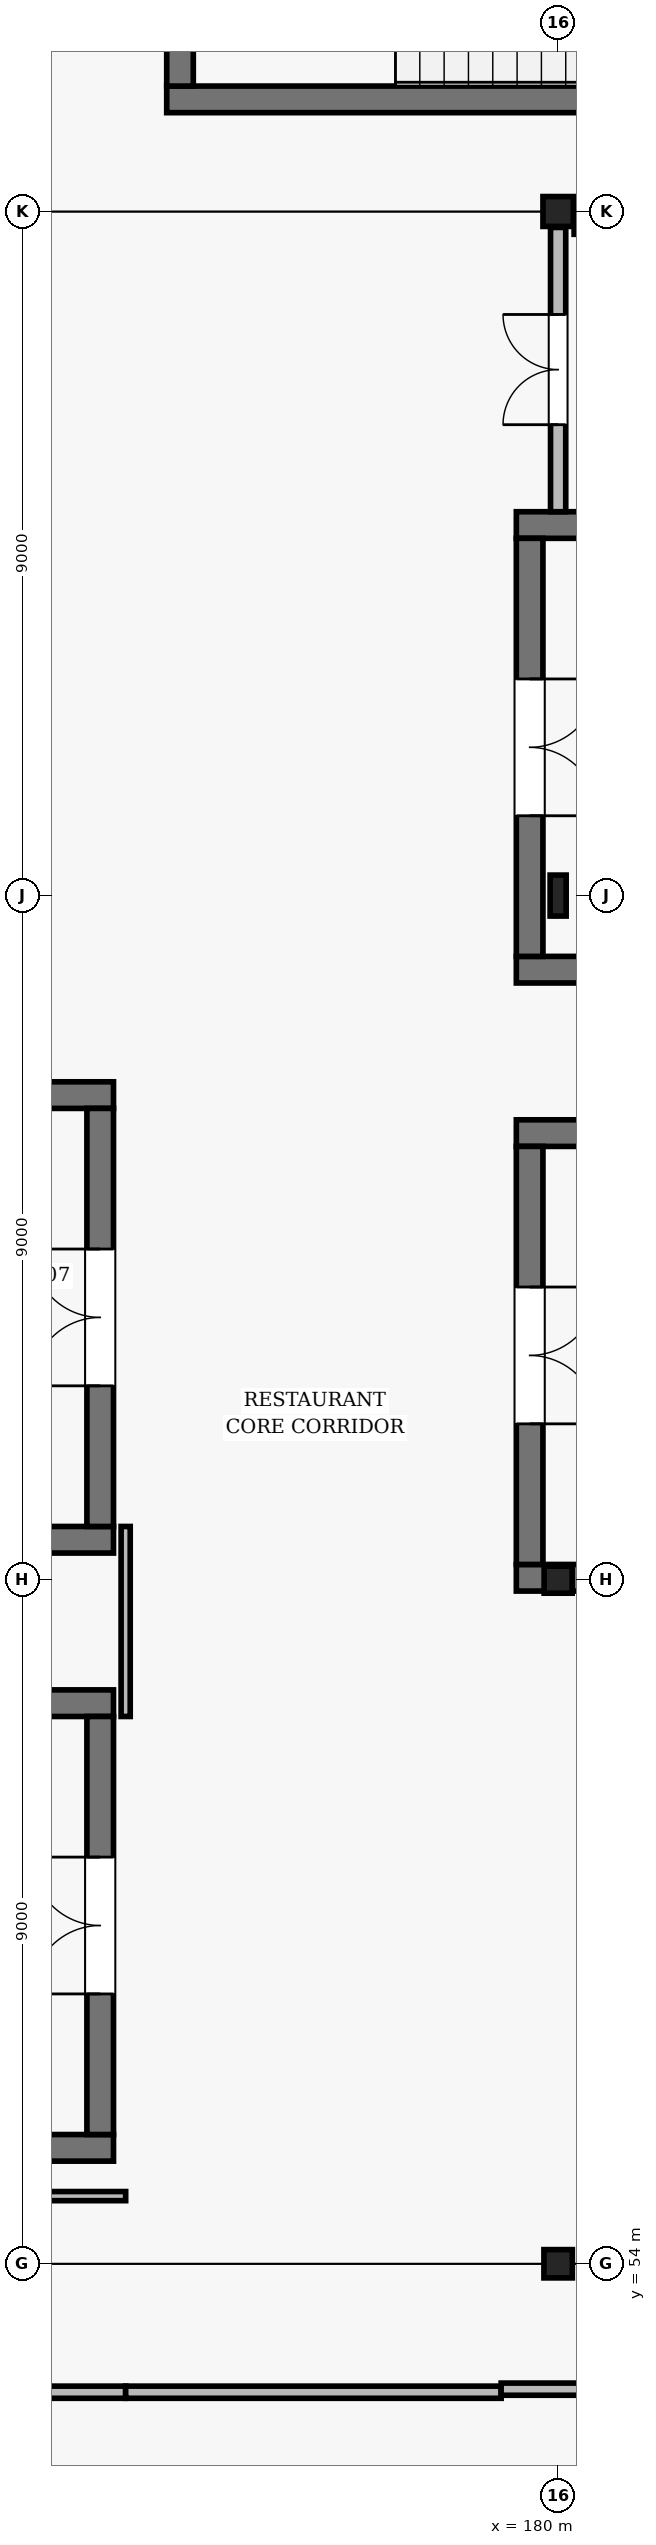
"""IFC4 building model, lengths in metres.
Left out: names, types, materials, properties, quantities, classifications, styles, units other than length and angle.
Written with IfcOpenShell. Run it as: python <this file> out.ifc"""

import sys

from ifc_helpers import new_model, si_unit, direction, frame, frame_2d, origin, origin_2d, place, context, subcontext, project, spatial, rectangle, i_section, extrude, element, fill, save


model = new_model("IFC4")
c1 = context("Model", 3, precision=1e-05, world=origin(), true_north=direction((0.0, 1.0)))
c2 = subcontext(c1, "Body", "Model", "MODEL_VIEW")
j1 = project(units=[si_unit("LENGTHUNIT", "METRE"), si_unit("PLANEANGLEUNIT", "RADIAN")], contexts=[c1])
p1 = place(None, origin())
s1 = spatial("IfcSite", under=j1, at=p1, CompositionType="ELEMENT")
p2 = place(p1, origin())
s2 = spatial("IfcBuilding", under=s1, at=p2, CompositionType="ELEMENT")
p3 = place(p2, frame((0.0, 0.0, 15.6)))
s3 = spatial("IfcBuildingStorey", under=s2, at=p3, CompositionType="ELEMENT", Elevation=15.6)
p4 = place(p3, frame((180.0, 54.0, 0.0), z_axis=(0.0, 0.0, 1.0), x_axis=(1.0, 0.0, 0.0)))
e1 = element("IfcColumn", 1, at=p4, inside=s3, PredefinedType="COLUMN", context=c2, shape_type="SweptSolid", body=[
    extrude(i_section(OverallWidth=0.374, OverallDepth=0.372, WebThickness=0.016, FlangeThickness=0.026, FilletRadius=0.016, at=origin_2d()), origin(), (0.0, 0.0, 1.0), 4.8),
])
p5 = place(p3, frame((180.0, 63.0, 0.0), z_axis=(0.0, 0.0, 1.0), x_axis=(1.0, 0.0, 0.0)))
e2 = element("IfcColumn", 2, at=p5, inside=s3, PredefinedType="COLUMN", context=c2, shape_type="SweptSolid", body=[
    extrude(i_section(OverallWidth=0.369, OverallDepth=0.356, WebThickness=0.011, FlangeThickness=0.018, FilletRadius=0.015, at=origin_2d()), origin(), (0.0, 0.0, 1.0), 4.8),
])
p6 = place(p3, frame((180.0, 72.0, 0.0), z_axis=(0.0, 0.0, 1.0), x_axis=(1.0, 0.0, 0.0)))
e3 = element("IfcColumn", 3, at=p6, inside=s3, PredefinedType="COLUMN", context=c2, shape_type="SweptSolid", body=[
    extrude(i_section(OverallWidth=0.211, OverallDepth=0.539, WebThickness=0.012, FlangeThickness=0.019, FilletRadius=0.014, at=origin_2d()), origin(), (0.0, 0.0, 1.0), 4.8),
])
p7 = place(p3, frame((180.0, 81.0, 0.0), z_axis=(0.0, 0.0, 1.0), x_axis=(1.0, 0.0, 0.0)))
e4 = element("IfcColumn", 4, at=p7, inside=s3, PredefinedType="COLUMN", context=c2, shape_type="SweptSolid", body=[
    extrude(i_section(OverallWidth=0.399, OverallDepth=0.393, WebThickness=0.023, FlangeThickness=0.037, FilletRadius=0.018, at=origin_2d()), origin(), (0.0, 0.0, 1.0), 4.8),
])
for number, where, z_axis, x_axis in (
    (5, (162.05, 55.525, 0.0), (0.0, 0.0, 1.0), (1.0, 0.0, 0.0)),
    (6, (174.15, 61.375, 0.0), (0.0, 0.0, 1.0), (-1.0, 0.0, 0.0)),
):
    element("IfcWall", number, at=place(p3, frame(where, z_axis=z_axis, x_axis=x_axis)), inside=s3, PredefinedType="SHEAR", context=c2, shape_type="SweptSolid", body=[
        extrude(rectangle(XDim=12.1, YDim=0.35, at=frame_2d((6.05, 0.0))), origin(), (0.0, 0.0, 1.0), 4.6),
    ])
p8 = place(p3, frame((173.975, 55.7, 0.0), z_axis=(0.0, 0.0, 1.0), x_axis=(0.0, 1.0, 0.0)))
e7 = element("IfcWall", 7, at=p8, inside=s3, PredefinedType="SHEAR", context=c2, shape_type="SweptSolid", body=[
    extrude(rectangle(XDim=5.5, YDim=0.35, at=frame_2d((2.75, 0.0))), origin(), (0.0, 0.0, 1.0), 4.6),
])
p9 = place(p8, frame((1.85, 0.0, 0.0)))
e8 = element("IfcOpeningElement", 8, at=p9, cuts=e7, PredefinedType="OPENING", context=c2, shape_type="SweptSolid", body=[
    extrude(rectangle(XDim=1.8, YDim=2.2, at=frame_2d((0.9, 1.1))), frame((0.0, 0.185, 0.0), z_axis=(0.0, -1.0, 0.0), x_axis=(1.0, 0.0, 0.0)), (0.0, 0.0, 1.0), 0.37),
])
for number, where, z_axis, x_axis in (
    (9, (162.05, 63.525, 0.0), (0.0, 0.0, 1.0), (1.0, 0.0, 0.0)),
    (10, (174.15, 69.375, 0.0), (0.0, 0.0, 1.0), (-1.0, 0.0, 0.0)),
):
    element("IfcWall", number, at=place(p3, frame(where, z_axis=z_axis, x_axis=x_axis)), inside=s3, PredefinedType="SHEAR", context=c2, shape_type="SweptSolid", body=[
        extrude(rectangle(XDim=12.1, YDim=0.35, at=frame_2d((6.05, 0.0))), origin(), (0.0, 0.0, 1.0), 4.6),
    ])
p10 = place(p3, frame((173.975, 63.7, 0.0), z_axis=(0.0, 0.0, 1.0), x_axis=(0.0, 1.0, 0.0)))
e11 = element("IfcWall", 11, at=p10, inside=s3, PredefinedType="SHEAR", context=c2, shape_type="SweptSolid", body=[
    extrude(rectangle(XDim=5.5, YDim=0.35, at=frame_2d((2.75, 0.0))), origin(), (0.0, 0.0, 1.0), 4.6),
])
p11 = place(p10, frame((1.85, 0.0, 0.0)))
e12 = element("IfcOpeningElement", 12, at=p11, cuts=e11, PredefinedType="OPENING", context=c2, shape_type="SweptSolid", body=[
    extrude(rectangle(XDim=1.8, YDim=2.2, at=frame_2d((0.9, 1.1))), frame((0.0, 0.185, 0.0), z_axis=(0.0, -1.0, 0.0), x_axis=(1.0, 0.0, 0.0)), (0.0, 0.0, 1.0), 0.37),
])
p12 = place(p3, frame((179.45, 63.025, 0.0), z_axis=(0.0, 0.0, 1.0), x_axis=(1.0, 0.0, 0.0)))
e13 = element("IfcWall", 13, at=p12, inside=s3, PredefinedType="SHEAR", context=c2, shape_type="SweptSolid", body=[
    extrude(rectangle(XDim=12.373, YDim=0.35, at=frame_2d((6.186, 0.0))), origin(), (0.0, 0.0, 1.0), 4.6),
])
p13 = place(p3, frame((191.55, 68.875, 0.0), z_axis=(0.0, 0.0, 1.0), x_axis=(-1.0, 0.0, 0.0)))
e14 = element("IfcWall", 14, at=p13, inside=s3, PredefinedType="SHEAR", context=c2, shape_type="SweptSolid", body=[
    extrude(rectangle(XDim=12.1, YDim=0.35, at=frame_2d((6.05, 0.0))), origin(), (0.0, 0.0, 1.0), 4.6),
])
p14 = place(p3, frame((179.625, 68.7, 0.0), z_axis=(0.0, 0.0, 1.0), x_axis=(0.0, -1.0, 0.0)))
e15 = element("IfcWall", 15, at=p14, inside=s3, PredefinedType="SHEAR", context=c2, shape_type="SweptSolid", body=[
    extrude(rectangle(XDim=5.5, YDim=0.35, at=frame_2d((2.75, 0.0))), origin(), (0.0, 0.0, 1.0), 4.6),
])
p15 = place(p14, frame((1.85, 0.0, 0.0)))
e16 = element("IfcOpeningElement", 16, at=p15, cuts=e15, PredefinedType="OPENING", context=c2, shape_type="SweptSolid", body=[
    extrude(rectangle(XDim=1.8, YDim=2.2, at=frame_2d((0.9, 1.1))), frame((0.0, 0.185, 0.0), z_axis=(0.0, -1.0, 0.0), x_axis=(1.0, 0.0, 0.0)), (0.0, 0.0, 1.0), 0.37),
])
for number, where, z_axis, x_axis in (
    (17, (179.45, 71.025, 0.0), (0.0, 0.0, 1.0), (1.0, 0.0, 0.0)),
    (18, (191.55, 76.875, 0.0), (0.0, 0.0, 1.0), (-1.0, 0.0, 0.0)),
):
    element("IfcWall", number, at=place(p3, frame(where, z_axis=z_axis, x_axis=x_axis)), inside=s3, PredefinedType="SHEAR", context=c2, shape_type="SweptSolid", body=[
        extrude(rectangle(XDim=12.1, YDim=0.35, at=frame_2d((6.05, 0.0))), origin(), (0.0, 0.0, 1.0), 4.6),
    ])
p16 = place(p3, frame((179.625, 76.7, 0.0), z_axis=(0.0, 0.0, 1.0), x_axis=(0.0, -1.0, 0.0)))
e19 = element("IfcWall", 19, at=p16, inside=s3, PredefinedType="SHEAR", context=c2, shape_type="SweptSolid", body=[
    extrude(rectangle(XDim=5.5, YDim=0.35, at=frame_2d((2.75, 0.0))), origin(), (0.0, 0.0, 1.0), 4.6),
])
p17 = place(p16, frame((1.85, 0.0, 0.0)))
e20 = element("IfcOpeningElement", 20, at=p17, cuts=e19, PredefinedType="OPENING", context=c2, shape_type="SweptSolid", body=[
    extrude(rectangle(XDim=1.8, YDim=2.2, at=frame_2d((0.9, 1.1))), frame((0.0, 0.185, 0.0), z_axis=(0.0, -1.0, 0.0), x_axis=(1.0, 0.0, 0.0)), (0.0, 0.0, 1.0), 0.37),
])
p18 = place(p3, frame((174.85, 82.475, 0.0), z_axis=(0.0, 0.0, 1.0), x_axis=(1.0, 0.0, 0.0)))
e21 = element("IfcWall", 21, at=p18, inside=s3, PredefinedType="SHEAR", context=c2, shape_type="SweptSolid", body=[
    extrude(rectangle(XDim=12.1, YDim=0.35, at=frame_2d((6.05, 0.0))), origin(), (0.0, 0.0, 1.0), 4.6),
])
p19 = place(p3, frame((175.025, 88.15, 0.0), z_axis=(0.0, 0.0, 1.0), x_axis=(0.0, -1.0, 0.0)))
e22 = element("IfcWall", 22, at=p19, inside=s3, PredefinedType="SHEAR", context=c2, shape_type="SweptSolid", body=[
    extrude(rectangle(XDim=5.5, YDim=0.35, at=frame_2d((2.75, 0.0))), origin(), (0.0, 0.0, 1.0), 4.6),
])
p20 = place(p19, frame((1.85, 0.0, 0.0)))
e23 = element("IfcOpeningElement", 23, at=p20, cuts=e22, PredefinedType="OPENING", context=c2, shape_type="SweptSolid", body=[
    extrude(rectangle(XDim=1.8, YDim=2.2, at=frame_2d((0.9, 1.1))), frame((0.0, 0.185, 0.0), z_axis=(0.0, -1.0, 0.0), x_axis=(1.0, 0.0, 0.0)), (0.0, 0.0, 1.0), 0.37),
])
p21 = place(p3, frame((180.21, 80.8, 0.0), z_axis=(0.0, 0.0, 1.0), x_axis=(1.0, 0.0, 0.0)))
e24 = element("IfcWall", 24, at=p21, inside=s3, PredefinedType="PARTITIONING", context=c2, shape_type="SweptSolid", body=[
    extrude(rectangle(XDim=11.23, YDim=0.2, at=frame_2d((5.615, 0.0))), origin(), (0.0, 0.0, 1.0), 3.812),
])
p22 = place(p3, frame((180.0, 77.05, 0.0), z_axis=(0.0, 0.0, 1.0), x_axis=(0.0, 1.0, 0.0)))
e25 = element("IfcWall", 25, at=p22, inside=s3, PredefinedType="PARTITIONING", context=c2, shape_type="SweptSolid", body=[
    extrude(rectangle(XDim=3.74, YDim=0.2, at=frame_2d((1.87, 0.0))), origin(), (0.0, 0.0, 1.0), 3.901),
])
p23 = place(p22, frame((1.145, 0.0, 0.0)))
e26 = element("IfcOpeningElement", 26, at=p23, cuts=e25, PredefinedType="OPENING", context=c2, shape_type="SweptSolid", body=[
    extrude(rectangle(XDim=1.45, YDim=2.3, at=frame_2d((0.725, 1.15))), frame((0.0, 0.11, 0.0), z_axis=(0.0, -1.0, 0.0), x_axis=(1.0, 0.0, 0.0)), (0.0, 0.0, 1.0), 0.22),
])
p24 = place(p3, frame((174.31, 63.7, 0.0), z_axis=(0.0, 0.0, 1.0), x_axis=(0.0, -1.0, 0.0)))
e27 = element("IfcWall", 27, at=p24, inside=s3, PredefinedType="PARTITIONING", context=c2, shape_type="SweptSolid", body=[
    extrude(rectangle(XDim=2.5, YDim=0.12, at=frame_2d((1.25, 0.0))), origin(), (0.0, 0.0, 1.0), 3.89),
])
p25 = place(p3, frame((174.31, 54.89, 0.0), z_axis=(0.0, 0.0, 1.0), x_axis=(-1.0, 0.0, 0.0)))
e28 = element("IfcWall", 28, at=p25, inside=s3, PredefinedType="PARTITIONING", context=c2, shape_type="SweptSolid", body=[
    extrude(rectangle(XDim=14.96, YDim=0.12, at=frame_2d((7.48, 0.0))), origin(), (0.0, 0.0, 1.0), 3.812),
])
p26 = place(p3, frame((153.14, 52.31, 0.0), z_axis=(0.0, 0.0, 1.0), x_axis=(1.0, 0.0, 0.0)))
e29 = element("IfcWall", 29, at=p26, inside=s3, PredefinedType="PARTITIONING", context=c2, shape_type="SweptSolid", body=[
    extrude(rectangle(XDim=21.17, YDim=0.16, at=frame_2d((10.585, 0.0))), origin(), (0.0, 0.0, 1.0), 3.73),
])
p27 = place(p26, frame((9.46, 0.0, 0.0)))
e30 = element("IfcOpeningElement", 30, at=p27, cuts=e29, PredefinedType="OPENING", context=c2, shape_type="SweptSolid", body=[
    extrude(rectangle(XDim=2.25, YDim=2.4, at=frame_2d((1.125, 1.2))), frame((0.0, 0.09, 0.0), z_axis=(0.0, -1.0, 0.0), x_axis=(1.0, 0.0, 0.0)), (0.0, 0.0, 1.0), 0.18),
])
p28 = place(p3, frame((174.31, 52.31, 0.0), z_axis=(0.0, 0.0, 1.0), x_axis=(1.0, 0.0, 0.0)))
e31 = element("IfcWall", 31, at=p28, inside=s3, PredefinedType="PARTITIONING", context=c2, shape_type="SweptSolid", body=[
    extrude(rectangle(XDim=4.94, YDim=0.16, at=frame_2d((2.47, 0.0))), origin(), (0.0, 0.0, 1.0), 4.128),
])
p29 = place(p3, frame((179.25, 52.35, 0.0), z_axis=(0.0, 0.0, 1.0), x_axis=(1.0, 0.0, 0.0)))
e32 = element("IfcWall", 32, at=p29, inside=s3, PredefinedType="PARTITIONING", context=c2, shape_type="SweptSolid", body=[
    extrude(rectangle(XDim=12.738, YDim=0.16, at=frame_2d((6.369, 0.0))), origin(), (0.0, 0.0, 1.0), 3.73),
])
p30 = place(p9, origin())
e33 = element("IfcDoor", 33, at=p30, inside=s3, OperationType="DOUBLE_DOOR_SINGLE_SWING", PredefinedType="DOOR", context=c2, shape_type="SweptSolid", body=[
    extrude(rectangle(XDim=1.8, YDim=2.2, at=frame_2d((0.9, 1.1))), frame((0.0, 0.025, 0.0), z_axis=(0.0, -1.0, 0.0), x_axis=(1.0, 0.0, 0.0)), (0.0, 0.0, 1.0), 0.05),
])
fill(e8, e33)
p31 = place(p11, origin())
e34 = element("IfcDoor", 34, at=p31, inside=s3, OperationType="DOUBLE_DOOR_SINGLE_SWING", PredefinedType="DOOR", context=c2, shape_type="SweptSolid", body=[
    extrude(rectangle(XDim=1.8, YDim=2.2, at=frame_2d((0.9, 1.1))), frame((0.0, 0.025, 0.0), z_axis=(0.0, -1.0, 0.0), x_axis=(1.0, 0.0, 0.0)), (0.0, 0.0, 1.0), 0.05),
])
fill(e12, e34)
p32 = place(p15, origin())
e35 = element("IfcDoor", 35, at=p32, inside=s3, OperationType="DOUBLE_DOOR_SINGLE_SWING", PredefinedType="DOOR", context=c2, shape_type="SweptSolid", body=[
    extrude(rectangle(XDim=1.8, YDim=2.2, at=frame_2d((0.9, 1.1))), frame((0.0, 0.025, 0.0), z_axis=(0.0, -1.0, 0.0), x_axis=(1.0, 0.0, 0.0)), (0.0, 0.0, 1.0), 0.05),
])
fill(e16, e35)
p33 = place(p17, origin())
e36 = element("IfcDoor", 36, at=p33, inside=s3, OperationType="DOUBLE_DOOR_SINGLE_SWING", PredefinedType="DOOR", context=c2, shape_type="SweptSolid", body=[
    extrude(rectangle(XDim=1.8, YDim=2.2, at=frame_2d((0.9, 1.1))), frame((0.0, 0.025, 0.0), z_axis=(0.0, -1.0, 0.0), x_axis=(1.0, 0.0, 0.0)), (0.0, 0.0, 1.0), 0.05),
])
fill(e20, e36)
p34 = place(p23, origin())
e37 = element("IfcDoor", 37, at=p34, inside=s3, OperationType="DOUBLE_DOOR_SINGLE_SWING", PredefinedType="DOOR", context=c2, shape_type="SweptSolid", body=[
    extrude(rectangle(XDim=1.45, YDim=2.3, at=frame_2d((0.725, 1.15))), frame((0.0, 0.025, 0.0), z_axis=(0.0, -1.0, 0.0), x_axis=(1.0, 0.0, 0.0)), (0.0, 0.0, 1.0), 0.05),
])
fill(e26, e37)
save(model, sys.argv[1])
